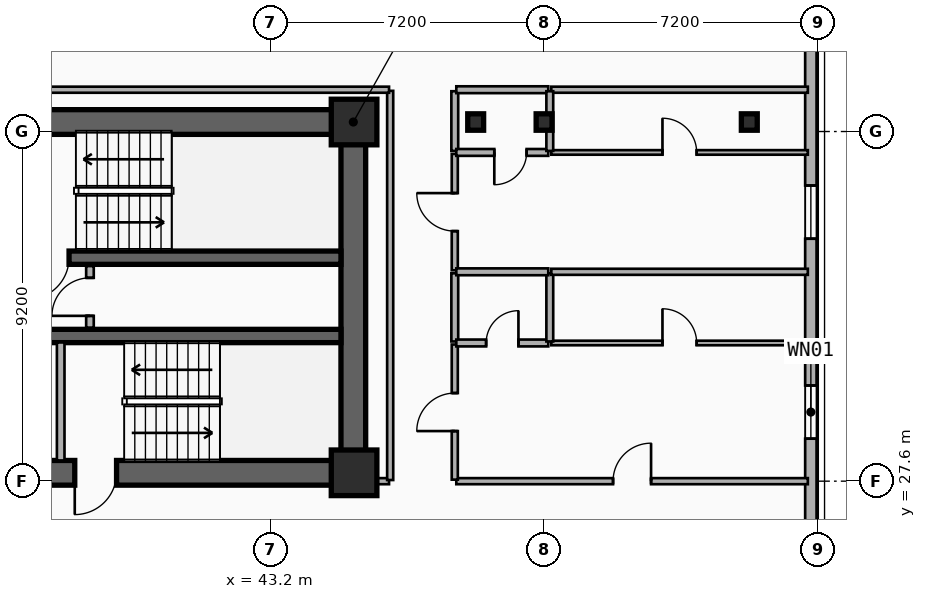
"""IFC4 building model, lengths in metres.
Left out: names, types, materials, properties, quantities, classifications, styles, units other than length and angle.
Written with IfcOpenShell. Run it as: python <this file> out.ifc"""

import sys

from ifc_helpers import new_model, si_unit, direction, frame, frame_2d, origin, origin_2d, place, context, subcontext, project, spatial, rectangle, i_section, extrude, element, fill, save


model = new_model("IFC4")
c1 = context("Model", 3, precision=1e-05, world=origin(), true_north=direction((0.0, 1.0)))
c2 = subcontext(c1, "Body", "Model", "MODEL_VIEW")
j1 = project(units=[si_unit("LENGTHUNIT", "METRE"), si_unit("PLANEANGLEUNIT", "RADIAN")], contexts=[c1])
p1 = place(None, origin())
s1 = spatial("IfcSite", under=j1, at=p1, CompositionType="ELEMENT")
p2 = place(p1, origin())
s2 = spatial("IfcBuilding", under=s1, at=p2, CompositionType="ELEMENT")
p3 = place(p2, frame((0.0, 0.0, 129.3)))
s3 = spatial("IfcBuildingStorey", under=s2, at=p3, CompositionType="ELEMENT", Elevation=129.3)
p4 = place(p3, frame((12.15, 37.05, 0.0), z_axis=(0.0, 0.0, 1.0), x_axis=(1.0, 0.0, 0.0)))
e1 = element("IfcWall", 1, at=p4, inside=s3, PredefinedType="SHEAR", context=c2, shape_type="SweptSolid", body=[
    extrude(rectangle(XDim=33.23, YDim=0.65, at=frame_2d((16.615, 0.0))), origin(), (0.0, 0.0, 1.0), 3.6),
])
p5 = place(p3, frame((45.38, 27.82, 0.0), z_axis=(0.0, 0.0, 1.0), x_axis=(-1.0, 0.0, 0.0)))
e2 = element("IfcWall", 2, at=p5, inside=s3, PredefinedType="SHEAR", context=c2, shape_type="SweptSolid", body=[
    extrude(rectangle(XDim=12.23, YDim=0.65, at=frame_2d((6.115, 0.0))), origin(), (0.0, 0.0, 1.0), 3.6),
])
p6 = place(p5, frame((9.93, 0.0, 0.0)))
e3 = element("IfcOpeningElement", 3, at=p6, cuts=e2, PredefinedType="OPENING", context=c2, shape_type="SweptSolid", body=[
    extrude(rectangle(XDim=1.1, YDim=2.15, at=frame_2d((0.55, 1.075))), frame((0.0, 0.335, 0.0), z_axis=(0.0, -1.0, 0.0), x_axis=(1.0, 0.0, 0.0)), (0.0, 0.0, 1.0), 0.67),
])
p7 = place(p5, frame((6.23, 0.0, 0.0)))
e4 = element("IfcOpeningElement", 4, at=p7, cuts=e2, PredefinedType="OPENING", context=c2, shape_type="SweptSolid", body=[
    extrude(rectangle(XDim=1.1, YDim=2.15, at=frame_2d((0.55, 1.075))), frame((0.0, 0.335, 0.0), z_axis=(0.0, -1.0, 0.0), x_axis=(1.0, 0.0, 0.0)), (0.0, 0.0, 1.0), 0.67),
])
p8 = place(p3, frame((45.38, 28.145, 0.0), z_axis=(0.0, 0.0, 1.0), x_axis=(0.0, 1.0, 0.0)))
e5 = element("IfcWall", 5, at=p8, inside=s3, PredefinedType="SHEAR", context=c2, shape_type="SweptSolid", body=[
    extrude(rectangle(XDim=8.58, YDim=0.65, at=frame_2d((4.29, 0.0))), origin(), (0.0, 0.0, 1.0), 3.6),
])
p9 = place(p3, frame((45.055, 33.48, 0.0), z_axis=(0.0, 0.0, 1.0), x_axis=(-1.0, 0.0, 0.0)))
e6 = element("IfcWall", 6, at=p9, inside=s3, PredefinedType="SHEAR", context=c2, shape_type="SweptSolid", body=[
    extrude(rectangle(XDim=8.5, YDim=0.35, at=frame_2d((4.25, 0.0))), origin(), (0.0, 0.0, 1.0), 3.6),
])
p10 = place(p9, frame((7.155, 0.0, 0.0)))
e7 = element("IfcOpeningElement", 7, at=p10, cuts=e6, PredefinedType="OPENING", context=c2, shape_type="SweptSolid", body=[
    extrude(rectangle(XDim=1.1, YDim=2.15, at=frame_2d((0.55, 1.075))), frame((0.0, 0.185, 0.0), z_axis=(0.0, -1.0, 0.0), x_axis=(1.0, 0.0, 0.0)), (0.0, 0.0, 1.0), 0.37),
])
p11 = place(p3, frame((36.555, 31.42, 0.0), z_axis=(0.0, 0.0, 1.0), x_axis=(1.0, 0.0, 0.0)))
e8 = element("IfcWall", 8, at=p11, inside=s3, PredefinedType="SHEAR", context=c2, shape_type="SweptSolid", body=[
    extrude(rectangle(XDim=8.5, YDim=0.35, at=frame_2d((4.25, 0.0))), origin(), (0.0, 0.0, 1.0), 3.6),
])
for number, where, z_axis, x_axis in (
    (9, (45.4, 27.82, 0.0), (0.0, 0.0, 1.0), (1.0, 0.0, 0.0)),
    (10, (45.4, 37.05, 0.0), (0.0, 0.0, 1.0), (1.0, 0.0, 0.0)),
):
    element("IfcColumn", number, at=place(p3, frame(where, z_axis=z_axis, x_axis=x_axis)), inside=s3, PredefinedType="COLUMN", context=c2, shape_type="SweptSolid", body=[
        extrude(rectangle(XDim=1.2, YDim=1.2, at=origin_2d()), origin(), (0.0, 0.0, 1.0), 3.6),
    ])
for number, where, z_axis, x_axis in (
    (11, (48.6, 37.05, 0.0), (0.0, 0.0, 1.0), (1.0, 0.0, 0.0)),
    (12, (50.4, 37.05, 0.0), (0.0, 0.0, 1.0), (1.0, 0.0, 0.0)),
    (13, (55.8, 37.05, 0.0), (0.0, 0.0, 1.0), (1.0, 0.0, 0.0)),
):
    element("IfcColumn", number, at=place(p3, frame(where, z_axis=z_axis, x_axis=x_axis)), inside=s3, PredefinedType="COLUMN", context=c2, shape_type="SweptSolid", body=[
        extrude(i_section(OverallWidth=0.418, OverallDepth=0.432, WebThickness=0.035, FlangeThickness=0.056, FilletRadius=0.015, at=origin_2d()), origin(), (0.0, 0.0, 1.0), 3.6),
    ])
p12 = place(p3, frame((57.42, 39.0, 0.0), z_axis=(0.0, 0.0, 1.0), x_axis=(0.0, -1.0, 0.0)))
e14 = element("IfcWall", 14, at=p12, inside=s3, PredefinedType="SOLIDWALL", context=c2, shape_type="SweptSolid", body=[
    extrude(rectangle(XDim=18.0, YDim=0.3, at=frame_2d((9.0, 0.0))), origin(), (0.0, 0.0, 1.0), 3.28),
])
p13 = place(p12, frame((8.882, 0.0, 0.65)))
e15 = element("IfcOpeningElement", 15, at=p13, cuts=e14, PredefinedType="OPENING", context=c2, shape_type="SweptSolid", body=[
    extrude(rectangle(XDim=1.4, YDim=1.8, at=frame_2d((0.7, 0.9))), frame((0.0, 0.16, 0.0), z_axis=(0.0, -1.0, 0.0), x_axis=(1.0, 0.0, 0.0)), (0.0, 0.0, 1.0), 0.32),
])
p14 = place(p12, frame((3.621, 0.0, 0.65)))
e16 = element("IfcOpeningElement", 16, at=p14, cuts=e14, PredefinedType="OPENING", context=c2, shape_type="SweptSolid", body=[
    extrude(rectangle(XDim=1.4, YDim=1.8, at=frame_2d((0.7, 0.9))), frame((0.0, 0.16, 0.0), z_axis=(0.0, -1.0, 0.0), x_axis=(1.0, 0.0, 0.0)), (0.0, 0.0, 1.0), 0.32),
])
p15 = place(p12, frame((14.127, 0.0, 0.65)))
e17 = element("IfcOpeningElement", 17, at=p15, cuts=e14, PredefinedType="OPENING", context=c2, shape_type="SweptSolid", body=[
    extrude(rectangle(XDim=1.4, YDim=1.8, at=frame_2d((0.7, 0.9))), frame((0.0, 0.16, 0.0), z_axis=(0.0, -1.0, 0.0), x_axis=(1.0, 0.0, 0.0)), (0.0, 0.0, 1.0), 0.32),
])
p16 = place(p12, frame((15.903, 0.0, 0.65)))
e18 = element("IfcOpeningElement", 18, at=p16, cuts=e14, PredefinedType="OPENING", context=c2, shape_type="SweptSolid", body=[
    extrude(rectangle(XDim=1.4, YDim=1.8, at=frame_2d((0.7, 0.9))), frame((0.0, 0.16, 0.0), z_axis=(0.0, -1.0, 0.0), x_axis=(1.0, 0.0, 0.0)), (0.0, 0.0, 1.0), 0.32),
])
p17 = place(p3, frame((37.68, 28.145, 0.0), z_axis=(0.0, 0.0, 1.0), x_axis=(0.0, 1.0, 0.0)))
e19 = element("IfcWall", 19, at=p17, inside=s3, PredefinedType="PARTITIONING", context=c2, shape_type="SweptSolid", body=[
    extrude(rectangle(XDim=3.105, YDim=0.2, at=frame_2d((1.552, 0.0))), origin(), (0.0, 0.0, 1.0), 2.66),
])
p18 = place(p3, frame((38.45, 31.64, 0.0), z_axis=(0.0, 0.0, 1.0), x_axis=(0.0, 1.0, 0.0)))
e20 = element("IfcWall", 20, at=p18, inside=s3, PredefinedType="PARTITIONING", context=c2, shape_type="SweptSolid", body=[
    extrude(rectangle(XDim=1.62, YDim=0.2, at=frame_2d((0.81, 0.0))), origin(), (0.0, 0.0, 1.0), 3.28),
])
p19 = place(p18, frame((0.31, 0.0, 0.0)))
e21 = element("IfcOpeningElement", 21, at=p19, cuts=e20, PredefinedType="OPENING", context=c2, shape_type="SweptSolid", body=[
    extrude(rectangle(XDim=1.0, YDim=2.15, at=frame_2d((0.5, 1.075))), frame((0.0, 0.11, 0.0), z_axis=(0.0, -1.0, 0.0), x_axis=(1.0, 0.0, 0.0)), (0.0, 0.0, 1.0), 0.22),
])
p20 = place(p3, frame((48.09, 27.6, 0.0), z_axis=(0.0, 0.0, 1.0), x_axis=(1.0, 0.0, 0.0)))
e22 = element("IfcWall", 22, at=p20, inside=s3, PredefinedType="PARTITIONING", context=c2, shape_type="SweptSolid", body=[
    extrude(rectangle(XDim=9.25, YDim=0.16, at=frame_2d((4.625, 0.0))), origin(), (0.0, 0.0, 1.0), 2.61),
])
p21 = place(p20, frame((4.125, 0.0, 0.0)))
e23 = element("IfcOpeningElement", 23, at=p21, cuts=e22, PredefinedType="OPENING", context=c2, shape_type="SweptSolid", body=[
    extrude(rectangle(XDim=1.0, YDim=2.15, at=frame_2d((0.5, 1.075))), frame((0.0, 0.09, 0.0), z_axis=(0.0, -1.0, 0.0), x_axis=(1.0, 0.0, 0.0)), (0.0, 0.0, 1.0), 0.18),
])
p22 = place(p3, frame((48.05, 27.64, 0.0), z_axis=(0.0, 0.0, 1.0), x_axis=(0.0, 1.0, 0.0)))
e24 = element("IfcWall", 24, at=p22, inside=s3, PredefinedType="PARTITIONING", context=c2, shape_type="SweptSolid", body=[
    extrude(rectangle(XDim=3.556, YDim=0.16, at=frame_2d((1.778, 0.0))), origin(), (0.0, 0.0, 1.0), 3.28),
])
p23 = place(p22, frame((1.278, 0.0, 0.0)))
e25 = element("IfcOpeningElement", 25, at=p23, cuts=e24, PredefinedType="OPENING", context=c2, shape_type="SweptSolid", body=[
    extrude(rectangle(XDim=1.0, YDim=2.15, at=frame_2d((0.5, 1.075))), frame((0.0, 0.09, 0.0), z_axis=(0.0, -1.0, 0.0), x_axis=(1.0, 0.0, 0.0)), (0.0, 0.0, 1.0), 0.18),
])
p24 = place(p3, frame((48.05, 31.276, 0.0), z_axis=(0.0, 0.0, 1.0), x_axis=(0.0, 1.0, 0.0)))
e26 = element("IfcWall", 26, at=p24, inside=s3, PredefinedType="PLUMBINGWALL", context=c2, shape_type="SweptSolid", body=[
    extrude(rectangle(XDim=1.793, YDim=0.18, at=frame_2d((0.896, 0.0))), origin(), (0.0, 0.0, 1.0), 3.28),
])
p25 = place(p3, frame((48.05, 33.149, 0.0), z_axis=(0.0, 0.0, 1.0), x_axis=(0.0, 1.0, 0.0)))
e27 = element("IfcWall", 27, at=p25, inside=s3, PredefinedType="PARTITIONING", context=c2, shape_type="SweptSolid", body=[
    extrude(rectangle(XDim=3.061, YDim=0.16, at=frame_2d((1.531, 0.0))), origin(), (0.0, 0.0, 1.0), 3.28),
])
p26 = place(p25, frame((1.031, 0.0, 0.0)))
e28 = element("IfcOpeningElement", 28, at=p26, cuts=e27, PredefinedType="OPENING", context=c2, shape_type="SweptSolid", body=[
    extrude(rectangle(XDim=1.0, YDim=2.15, at=frame_2d((0.5, 1.075))), frame((0.0, 0.09, 0.0), z_axis=(0.0, -1.0, 0.0), x_axis=(1.0, 0.0, 0.0)), (0.0, 0.0, 1.0), 0.18),
])
p27 = place(p3, frame((48.05, 36.29, 0.0), z_axis=(0.0, 0.0, 1.0), x_axis=(0.0, 1.0, 0.0)))
e29 = element("IfcWall", 29, at=p27, inside=s3, PredefinedType="PLUMBINGWALL", context=c2, shape_type="SweptSolid", body=[
    extrude(rectangle(XDim=1.57, YDim=0.18, at=frame_2d((0.785, 0.0))), origin(), (0.0, 0.0, 1.0), 2.76),
])
p28 = place(p3, frame((48.09, 37.9, 0.0), z_axis=(0.0, 0.0, 1.0), x_axis=(1.0, 0.0, 0.0)))
e30 = element("IfcWall", 30, at=p28, inside=s3, PredefinedType="PLUMBINGWALL", context=c2, shape_type="SweptSolid", body=[
    extrude(rectangle(XDim=2.42, YDim=0.18, at=frame_2d((1.21, 0.0))), origin(), (0.0, 0.0, 1.0), 3.28),
])
p29 = place(p3, frame((50.59, 37.9, 0.0), z_axis=(0.0, 0.0, 1.0), x_axis=(1.0, 0.0, 0.0)))
e31 = element("IfcWall", 31, at=p29, inside=s3, PredefinedType="PARTITIONING", context=c2, shape_type="SweptSolid", body=[
    extrude(rectangle(XDim=6.75, YDim=0.16, at=frame_2d((3.375, 0.0))), origin(), (0.0, 0.0, 1.0), 3.28),
])
p30 = place(p3, frame((48.09, 31.236, 0.0), z_axis=(0.0, 0.0, 1.0), x_axis=(1.0, 0.0, 0.0)))
e32 = element("IfcWall", 32, at=p30, inside=s3, PredefinedType="PLUMBINGWALL", context=c2, shape_type="SweptSolid", body=[
    extrude(rectangle(XDim=2.42, YDim=0.18, at=frame_2d((1.21, 0.0))), origin(), (0.0, 0.0, 1.0), 2.61),
])
p31 = place(p30, frame((0.785, 0.0, 0.0)))
e33 = element("IfcOpeningElement", 33, at=p31, cuts=e32, PredefinedType="OPENING", context=c2, shape_type="SweptSolid", body=[
    extrude(rectangle(XDim=0.85, YDim=2.1, at=frame_2d((0.425, 1.05))), frame((0.0, 0.1, 0.0), z_axis=(0.0, -1.0, 0.0), x_axis=(1.0, 0.0, 0.0)), (0.0, 0.0, 1.0), 0.2),
])
p32 = place(p3, frame((50.59, 31.236, 0.0), z_axis=(0.0, 0.0, 1.0), x_axis=(1.0, 0.0, 0.0)))
e34 = element("IfcWall", 34, at=p32, inside=s3, PredefinedType="PARTITIONING", context=c2, shape_type="SweptSolid", body=[
    extrude(rectangle(XDim=6.75, YDim=0.12, at=frame_2d((3.375, 0.0))), origin(), (0.0, 0.0, 1.0), 2.61),
])
p33 = place(p32, frame((2.925, 0.0, 0.0)))
e35 = element("IfcOpeningElement", 35, at=p33, cuts=e34, PredefinedType="OPENING", context=c2, shape_type="SweptSolid", body=[
    extrude(rectangle(XDim=0.9, YDim=2.1, at=frame_2d((0.45, 1.05))), frame((0.0, 0.07, 0.0), z_axis=(0.0, -1.0, 0.0), x_axis=(1.0, 0.0, 0.0)), (0.0, 0.0, 1.0), 0.14),
])
p34 = place(p3, frame((50.55, 31.276, 0.0), z_axis=(0.0, 0.0, 1.0), x_axis=(0.0, 1.0, 0.0)))
e36 = element("IfcWall", 36, at=p34, inside=s3, PredefinedType="PLUMBINGWALL", context=c2, shape_type="SweptSolid", body=[
    extrude(rectangle(XDim=1.793, YDim=0.18, at=frame_2d((0.896, 0.0))), origin(), (0.0, 0.0, 1.0), 2.61),
])
p35 = place(p3, frame((48.09, 33.109, 0.0), z_axis=(0.0, 0.0, 1.0), x_axis=(1.0, 0.0, 0.0)))
e37 = element("IfcWall", 37, at=p35, inside=s3, PredefinedType="PLUMBINGWALL", context=c2, shape_type="SweptSolid", body=[
    extrude(rectangle(XDim=2.42, YDim=0.18, at=frame_2d((1.21, 0.0))), origin(), (0.0, 0.0, 1.0), 2.61),
])
p36 = place(p3, frame((50.59, 33.109, 0.0), z_axis=(0.0, 0.0, 1.0), x_axis=(1.0, 0.0, 0.0)))
e38 = element("IfcWall", 38, at=p36, inside=s3, PredefinedType="PARTITIONING", context=c2, shape_type="SweptSolid", body=[
    extrude(rectangle(XDim=6.75, YDim=0.16, at=frame_2d((3.375, 0.0))), origin(), (0.0, 0.0, 1.0), 2.61),
])
p37 = place(p3, frame((50.51, 36.25, 0.0), z_axis=(0.0, 0.0, 1.0), x_axis=(-1.0, 0.0, 0.0)))
e39 = element("IfcWall", 39, at=p37, inside=s3, PredefinedType="PLUMBINGWALL", context=c2, shape_type="SweptSolid", body=[
    extrude(rectangle(XDim=2.42, YDim=0.18, at=frame_2d((1.21, 0.0))), origin(), (0.0, 0.0, 1.0), 2.61),
])
p38 = place(p37, frame((0.57, 0.0, 0.0)))
e40 = element("IfcOpeningElement", 40, at=p38, cuts=e39, PredefinedType="OPENING", context=c2, shape_type="SweptSolid", body=[
    extrude(rectangle(XDim=0.85, YDim=2.1, at=frame_2d((0.425, 1.05))), frame((0.0, 0.1, 0.0), z_axis=(0.0, -1.0, 0.0), x_axis=(1.0, 0.0, 0.0)), (0.0, 0.0, 1.0), 0.2),
])
p39 = place(p3, frame((50.59, 36.25, 0.0), z_axis=(0.0, 0.0, 1.0), x_axis=(1.0, 0.0, 0.0)))
e41 = element("IfcWall", 41, at=p39, inside=s3, PredefinedType="PARTITIONING", context=c2, shape_type="SweptSolid", body=[
    extrude(rectangle(XDim=6.75, YDim=0.12, at=frame_2d((3.375, 0.0))), origin(), (0.0, 0.0, 1.0), 2.61),
])
p40 = place(p39, frame((2.925, 0.0, 0.0)))
e42 = element("IfcOpeningElement", 42, at=p40, cuts=e41, PredefinedType="OPENING", context=c2, shape_type="SweptSolid", body=[
    extrude(rectangle(XDim=0.9, YDim=2.1, at=frame_2d((0.45, 1.05))), frame((0.0, 0.07, 0.0), z_axis=(0.0, -1.0, 0.0), x_axis=(1.0, 0.0, 0.0)), (0.0, 0.0, 1.0), 0.14),
])
p41 = place(p3, frame((50.55, 36.29, 0.0), z_axis=(0.0, 0.0, 1.0), x_axis=(0.0, 1.0, 0.0)))
e43 = element("IfcWall", 43, at=p41, inside=s3, PredefinedType="PLUMBINGWALL", context=c2, shape_type="SweptSolid", body=[
    extrude(rectangle(XDim=1.57, YDim=0.18, at=frame_2d((0.785, 0.0))), origin(), (0.0, 0.0, 1.0), 2.61),
])
p42 = place(p3, frame((45.41, 27.6, 0.0), z_axis=(0.0, 0.0, 1.0), x_axis=(1.0, 0.0, 0.0)))
e44 = element("IfcWall", 44, at=p42, inside=s3, PredefinedType="PARTITIONING", context=c2, shape_type="SweptSolid", body=[
    extrude(rectangle(XDim=0.91, YDim=0.16, at=frame_2d((0.455, 0.0))), origin(), (0.0, 0.0, 1.0), 2.252),
])
p43 = place(p3, frame((46.35, 27.63, 0.0), z_axis=(0.0, 0.0, 1.0), x_axis=(0.0, 1.0, 0.0)))
e45 = element("IfcWall", 45, at=p43, inside=s3, PredefinedType="PARTITIONING", context=c2, shape_type="SweptSolid", body=[
    extrude(rectangle(XDim=10.24, YDim=0.16, at=frame_2d((5.12, 0.0))), origin(), (0.0, 0.0, 1.0), 2.76),
])
p44 = place(p3, frame((11.28, 37.9, 0.0), z_axis=(0.0, 0.0, 1.0), x_axis=(1.0, 0.0, 0.0)))
e46 = element("IfcWall", 46, at=p44, inside=s3, PredefinedType="PARTITIONING", context=c2, shape_type="SweptSolid", body=[
    extrude(rectangle(XDim=35.04, YDim=0.16, at=frame_2d((17.52, 0.0))), origin(), (0.0, 0.0, 1.0), 3.28),
])
p45 = place(p13, origin())
e47 = element("IfcWindow", 47, at=p45, inside=s3, PartitioningType="SINGLE_PANEL", PredefinedType="WINDOW", context=c2, shape_type="SweptSolid", body=[
    extrude(rectangle(XDim=1.4, YDim=1.8, at=frame_2d((0.7, 0.9))), frame((0.0, 0.03, 0.0), z_axis=(0.0, -1.0, 0.0), x_axis=(1.0, 0.0, 0.0)), (0.0, 0.0, 1.0), 0.06),
])
fill(e15, e47)
p46 = place(p14, origin())
e48 = element("IfcWindow", 48, at=p46, inside=s3, PartitioningType="SINGLE_PANEL", PredefinedType="WINDOW", context=c2, shape_type="SweptSolid", body=[
    extrude(rectangle(XDim=1.4, YDim=1.8, at=frame_2d((0.7, 0.9))), frame((0.0, 0.03, 0.0), z_axis=(0.0, -1.0, 0.0), x_axis=(1.0, 0.0, 0.0)), (0.0, 0.0, 1.0), 0.06),
])
fill(e16, e48)
p47 = place(p10, origin())
e49 = element("IfcDoor", 49, at=p47, inside=s3, OperationType="SINGLE_SWING_RIGHT", PredefinedType="DOOR", context=c2, shape_type="SweptSolid", body=[
    extrude(rectangle(XDim=1.1, YDim=2.15, at=frame_2d((0.55, 1.075))), frame((0.0, 0.025, 0.0), z_axis=(0.0, -1.0, 0.0), x_axis=(1.0, 0.0, 0.0)), (0.0, 0.0, 1.0), 0.05),
])
fill(e7, e49)
p48 = place(p7, origin())
e50 = element("IfcDoor", 50, at=p48, inside=s3, OperationType="SINGLE_SWING_RIGHT", PredefinedType="DOOR", context=c2, shape_type="SweptSolid", body=[
    extrude(rectangle(XDim=1.1, YDim=2.15, at=frame_2d((0.55, 1.075))), frame((0.0, 0.025, 0.0), z_axis=(0.0, -1.0, 0.0), x_axis=(1.0, 0.0, 0.0)), (0.0, 0.0, 1.0), 0.05),
])
fill(e4, e50)
p49 = place(p19, origin())
e51 = element("IfcDoor", 51, at=p49, inside=s3, OperationType="SINGLE_SWING_LEFT", PredefinedType="DOOR", context=c2, shape_type="SweptSolid", body=[
    extrude(rectangle(XDim=1.0, YDim=2.15, at=frame_2d((0.5, 1.075))), frame((0.0, 0.025, 0.0), z_axis=(0.0, -1.0, 0.0), x_axis=(1.0, 0.0, 0.0)), (0.0, 0.0, 1.0), 0.05),
])
fill(e21, e51)
p50 = place(p21, origin())
e52 = element("IfcDoor", 52, at=p50, inside=s3, OperationType="SINGLE_SWING_RIGHT", PredefinedType="DOOR", context=c2, shape_type="SweptSolid", body=[
    extrude(rectangle(XDim=1.0, YDim=2.15, at=frame_2d((0.5, 1.075))), frame((0.0, 0.025, 0.0), z_axis=(0.0, -1.0, 0.0), x_axis=(1.0, 0.0, 0.0)), (0.0, 0.0, 1.0), 0.05),
])
fill(e23, e52)
p51 = place(p23, origin())
e53 = element("IfcDoor", 53, at=p51, inside=s3, OperationType="SINGLE_SWING_LEFT", PredefinedType="DOOR", context=c2, shape_type="SweptSolid", body=[
    extrude(rectangle(XDim=1.0, YDim=2.15, at=frame_2d((0.5, 1.075))), frame((0.0, 0.025, 0.0), z_axis=(0.0, -1.0, 0.0), x_axis=(1.0, 0.0, 0.0)), (0.0, 0.0, 1.0), 0.05),
])
fill(e25, e53)
p52 = place(p26, origin())
e54 = element("IfcDoor", 54, at=p52, inside=s3, OperationType="SINGLE_SWING_RIGHT", PredefinedType="DOOR", context=c2, shape_type="SweptSolid", body=[
    extrude(rectangle(XDim=1.0, YDim=2.15, at=frame_2d((0.5, 1.075))), frame((0.0, 0.025, 0.0), z_axis=(0.0, -1.0, 0.0), x_axis=(1.0, 0.0, 0.0)), (0.0, 0.0, 1.0), 0.05),
])
fill(e28, e54)
p53 = place(p31, origin())
e55 = element("IfcDoor", 55, at=p53, inside=s3, OperationType="SINGLE_SWING_RIGHT", PredefinedType="DOOR", context=c2, shape_type="SweptSolid", body=[
    extrude(rectangle(XDim=0.85, YDim=2.1, at=frame_2d((0.425, 1.05))), frame((0.0, 0.025, 0.0), z_axis=(0.0, -1.0, 0.0), x_axis=(1.0, 0.0, 0.0)), (0.0, 0.0, 1.0), 0.05),
])
fill(e33, e55)
p54 = place(p33, origin())
e56 = element("IfcDoor", 56, at=p54, inside=s3, OperationType="SINGLE_SWING_LEFT", PredefinedType="DOOR", context=c2, shape_type="SweptSolid", body=[
    extrude(rectangle(XDim=0.9, YDim=2.1, at=frame_2d((0.45, 1.05))), frame((0.0, 0.025, 0.0), z_axis=(0.0, -1.0, 0.0), x_axis=(1.0, 0.0, 0.0)), (0.0, 0.0, 1.0), 0.05),
])
fill(e35, e56)
p55 = place(p38, origin())
e57 = element("IfcDoor", 57, at=p55, inside=s3, OperationType="SINGLE_SWING_RIGHT", PredefinedType="DOOR", context=c2, shape_type="SweptSolid", body=[
    extrude(rectangle(XDim=0.85, YDim=2.1, at=frame_2d((0.425, 1.05))), frame((0.0, 0.025, 0.0), z_axis=(0.0, -1.0, 0.0), x_axis=(1.0, 0.0, 0.0)), (0.0, 0.0, 1.0), 0.05),
])
fill(e40, e57)
p56 = place(p40, origin())
e58 = element("IfcDoor", 58, at=p56, inside=s3, OperationType="SINGLE_SWING_LEFT", PredefinedType="DOOR", context=c2, shape_type="SweptSolid", body=[
    extrude(rectangle(XDim=0.9, YDim=2.1, at=frame_2d((0.45, 1.05))), frame((0.0, 0.025, 0.0), z_axis=(0.0, -1.0, 0.0), x_axis=(1.0, 0.0, 0.0)), (0.0, 0.0, 1.0), 0.05),
])
fill(e42, e58)
save(model, sys.argv[1])
